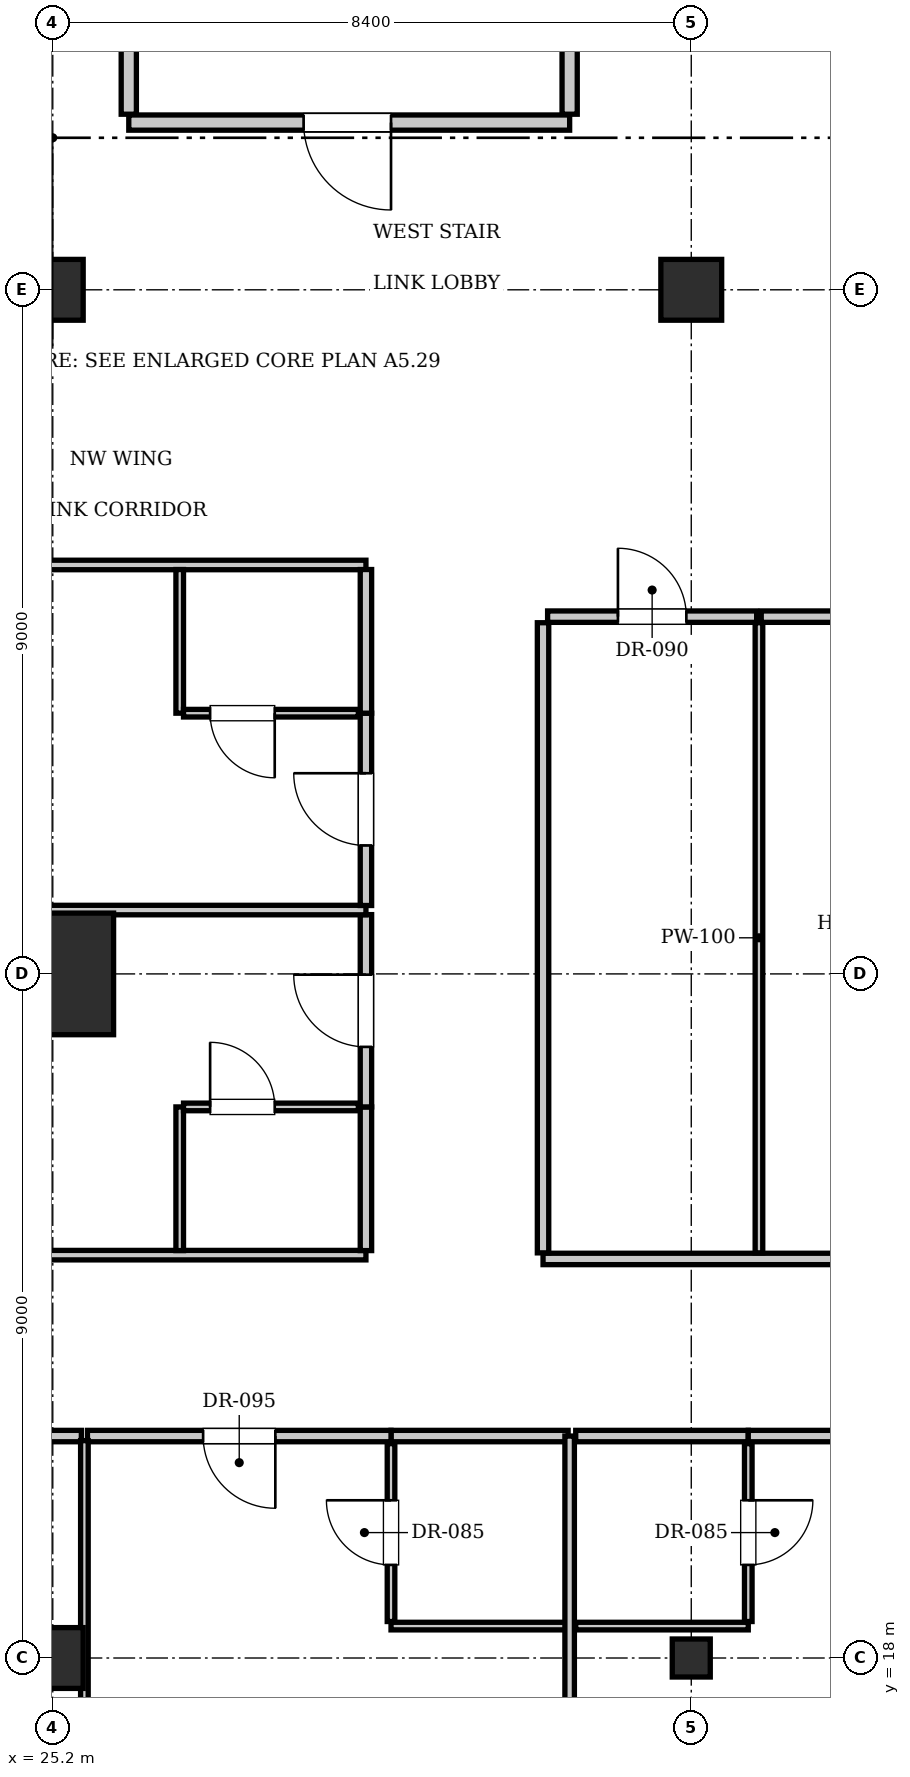
"""IFC4 building model, lengths in metres.
Left out: names, types, materials, properties, quantities, classifications, styles, units other than length and angle.
Written with IfcOpenShell. Run it as: python <this file> out.ifc"""

import sys

from ifc_helpers import new_model, si_unit, direction, frame, frame_2d, origin, origin_2d, place, context, subcontext, project, spatial, rectangle, i_section, extrude, element, fill, save


model = new_model("IFC4")
c1 = context("Model", 3, precision=1e-05, world=origin(), true_north=direction((0.0, 1.0)))
c2 = subcontext(c1, "Body", "Model", "MODEL_VIEW")
j1 = project(units=[si_unit("LENGTHUNIT", "METRE"), si_unit("PLANEANGLEUNIT", "RADIAN")], contexts=[c1])
p1 = place(None, origin())
s1 = spatial("IfcSite", under=j1, at=p1, CompositionType="ELEMENT")
p2 = place(p1, origin())
s2 = spatial("IfcBuilding", under=s1, at=p2, CompositionType="ELEMENT")
p3 = place(p2, frame((0.0, 0.0, 297.15)))
s3 = spatial("IfcBuildingStorey", under=s2, at=p3, CompositionType="ELEMENT", Elevation=297.15)
p4 = place(p3, frame((25.2, 27.0, 0.0), z_axis=(0.0, 0.0, 1.0), x_axis=(1.0, 0.0, 0.0)))
e1 = element("IfcColumn", 1, at=p4, inside=s3, PredefinedType="COLUMN", context=c2, shape_type="SweptSolid", body=[
    extrude(rectangle(XDim=1.6, YDim=1.6, at=origin_2d()), origin(), (0.0, 0.0, 1.0), 3.85),
])
for number, where, z_axis, x_axis in (
    (2, (25.2, 36.0, 0.0), (0.0, 0.0, 1.0), (1.0, 0.0, 0.0)),
    (3, (33.6, 36.0, 0.0), (0.0, 0.0, 1.0), (1.0, 0.0, 0.0)),
    (4, (25.2, 18.0, 0.0), (0.0, 0.0, 1.0), (1.0, 0.0, 0.0)),
):
    element("IfcColumn", number, at=place(p3, frame(where, z_axis=z_axis, x_axis=x_axis)), inside=s3, PredefinedType="COLUMN", context=c2, shape_type="SweptSolid", body=[
        extrude(rectangle(XDim=0.8, YDim=0.8, at=origin_2d()), origin(), (0.0, 0.0, 1.0), 3.85),
    ])
p5 = place(p3, frame((33.6, 18.0, 0.0), z_axis=(0.0, 0.0, 1.0), x_axis=(1.0, 0.0, 0.0)))
e5 = element("IfcColumn", 5, at=p5, inside=s3, PredefinedType="COLUMN", context=c2, shape_type="SweptSolid", body=[
    extrude(i_section(OverallWidth=0.5, OverallDepth=0.5, WebThickness=0.022, FlangeThickness=0.032, at=origin_2d()), origin(), (0.0, 0.0, 1.0), 3.85),
])
p6 = place(p3, frame((26.2, 38.2, 0.0), z_axis=(0.0, 0.0, 1.0), x_axis=(1.0, 0.0, 0.0)))
e6 = element("IfcWall", 6, at=p6, inside=s3, PredefinedType="PARTITIONING", context=c2, shape_type="SweptSolid", body=[
    extrude(rectangle(XDim=5.8, YDim=0.2, at=frame_2d((2.9, 0.0))), origin(), (0.0, 0.0, 1.0), 3.61),
])
p7 = place(p6, frame((2.3, 0.0, 0.0)))
e7 = element("IfcOpeningElement", 7, at=p7, cuts=e6, PredefinedType="OPENING", context=c2, shape_type="SweptSolid", body=[
    extrude(rectangle(XDim=1.15, YDim=2.15, at=frame_2d((0.575, 1.075))), frame((0.0, 0.11, 0.0), z_axis=(0.0, -1.0, 0.0), x_axis=(1.0, 0.0, 0.0)), (0.0, 0.0, 1.0), 0.22),
])
for number, where, z_axis, x_axis in (
    (8, (26.2, 38.31, 0.0), (0.0, 0.0, 1.0), (0.0, 1.0, 0.0)),
    (9, (32.0, 38.31, 0.0), (0.0, 0.0, 1.0), (0.0, 1.0, 0.0)),
):
    element("IfcWall", number, at=place(p3, frame(where, z_axis=z_axis, x_axis=x_axis)), inside=s3, PredefinedType="PARTITIONING", context=c2, shape_type="SweptSolid", body=[
        extrude(rectangle(XDim=3.07, YDim=0.2, at=frame_2d((1.535, 0.0))), origin(), (0.0, 0.0, 1.0), 3.61),
    ])
p8 = place(p3, frame((31.65, 23.25, 0.0), z_axis=(0.0, 0.0, 1.0), x_axis=(1.0, 0.0, 0.0)))
e10 = element("IfcWall", 10, at=p8, inside=s3, PredefinedType="PARTITIONING", context=c2, shape_type="SweptSolid", body=[
    extrude(rectangle(XDim=12.35, YDim=0.15, at=frame_2d((6.175, 0.0))), origin(), (0.0, 0.0, 1.0), 3.61),
])
p9 = place(p3, frame((31.65, 23.33, 0.0), z_axis=(0.0, 0.0, 1.0), x_axis=(0.0, 1.0, 0.0)))
e11 = element("IfcWall", 11, at=p9, inside=s3, PredefinedType="PARTITIONING", context=c2, shape_type="SweptSolid", body=[
    extrude(rectangle(XDim=8.29, YDim=0.15, at=frame_2d((4.145, 0.0))), origin(), (0.0, 0.0, 1.0), 3.61),
])
p10 = place(p3, frame((31.71, 31.7, 0.0), z_axis=(0.0, 0.0, 1.0), x_axis=(1.0, 0.0, 0.0)))
e12 = element("IfcWall", 12, at=p10, inside=s3, PredefinedType="PARTITIONING", context=c2, shape_type="SweptSolid", body=[
    extrude(rectangle(XDim=2.75, YDim=0.15, at=frame_2d((1.375, 0.0))), origin(), (0.0, 0.0, 1.0), 3.61),
])
p11 = place(p10, frame((0.925, 0.0, 0.0)))
e13 = element("IfcOpeningElement", 13, at=p11, cuts=e12, PredefinedType="OPENING", context=c2, shape_type="SweptSolid", body=[
    extrude(rectangle(XDim=0.9, YDim=2.1, at=frame_2d((0.45, 1.05))), frame((0.0, 0.085, 0.0), z_axis=(0.0, -1.0, 0.0), x_axis=(1.0, 0.0, 0.0)), (0.0, 0.0, 1.0), 0.17),
])
p12 = place(p3, frame((34.49, 23.33, 0.0), z_axis=(0.0, 0.0, 1.0), x_axis=(0.0, 1.0, 0.0)))
e14 = element("IfcWall", 14, at=p12, inside=s3, PredefinedType="PARTITIONING", context=c2, shape_type="SweptSolid", body=[
    extrude(rectangle(XDim=8.29, YDim=0.1, at=frame_2d((4.145, 0.0))), origin(), (0.0, 0.0, 1.0), 3.61),
])
p13 = place(p3, frame((34.521, 31.7, 0.0), z_axis=(0.0, 0.0, 1.0), x_axis=(1.0, 0.0, 0.0)))
e15 = element("IfcWall", 15, at=p13, inside=s3, PredefinedType="PARTITIONING", context=c2, shape_type="SweptSolid", body=[
    extrude(rectangle(XDim=4.139, YDim=0.15, at=frame_2d((2.069, 0.0))), origin(), (0.0, 0.0, 1.0), 3.61),
])
p14 = place(p13, frame((1.619, 0.0, 0.0)))
e16 = element("IfcOpeningElement", 16, at=p14, cuts=e15, PredefinedType="OPENING", context=c2, shape_type="SweptSolid", body=[
    extrude(rectangle(XDim=0.9, YDim=2.1, at=frame_2d((0.45, 1.05))), frame((0.0, 0.085, 0.0), z_axis=(0.0, -1.0, 0.0), x_axis=(1.0, 0.0, 0.0)), (0.0, 0.0, 1.0), 0.17),
])
p15 = place(p3, frame((29.65, 20.92, 0.0), z_axis=(0.0, 0.0, 1.0), x_axis=(1.0, 0.0, 0.0)))
e17 = element("IfcWall", 17, at=p15, inside=s3, PredefinedType="PARTITIONING", context=c2, shape_type="SweptSolid", body=[
    extrude(rectangle(XDim=2.33, YDim=0.15, at=frame_2d((1.165, 0.0))), origin(), (0.0, 0.0, 1.0), 3.61),
])
p16 = place(p3, frame((29.65, 18.42, 0.0), z_axis=(0.0, 0.0, 1.0), x_axis=(1.0, 0.0, 0.0)))
e18 = element("IfcWall", 18, at=p16, inside=s3, PredefinedType="PARTITIONING", context=c2, shape_type="SweptSolid", body=[
    extrude(rectangle(XDim=2.31, YDim=0.1, at=frame_2d((1.155, 0.0))), origin(), (0.0, 0.0, 1.0), 3.61),
])
p17 = place(p3, frame((29.65, 18.48, 0.0), z_axis=(0.0, 0.0, 1.0), x_axis=(0.0, 1.0, 0.0)))
e19 = element("IfcWall", 19, at=p17, inside=s3, PredefinedType="PARTITIONING", context=c2, shape_type="SweptSolid", body=[
    extrude(rectangle(XDim=2.34, YDim=0.1, at=frame_2d((1.17, 0.0))), origin(), (0.0, 0.0, 1.0), 3.61),
])
p18 = place(p17, frame((0.745, 0.0, 0.0)))
e20 = element("IfcOpeningElement", 20, at=p18, cuts=e19, PredefinedType="OPENING", context=c2, shape_type="SweptSolid", body=[
    extrude(rectangle(XDim=0.85, YDim=2.1, at=frame_2d((0.425, 1.05))), frame((0.0, 0.06, 0.0), z_axis=(0.0, -1.0, 0.0), x_axis=(1.0, 0.0, 0.0)), (0.0, 0.0, 1.0), 0.12),
])
p19 = place(p3, frame((20.62, 20.92, 0.0), z_axis=(0.0, 0.0, 1.0), x_axis=(1.0, 0.0, 0.0)))
e21 = element("IfcWall", 21, at=p19, inside=s3, PredefinedType="PARTITIONING", context=c2, shape_type="SweptSolid", body=[
    extrude(rectangle(XDim=4.956, YDim=0.15, at=frame_2d((2.478, 0.0))), origin(), (0.0, 0.0, 1.0), 3.61),
])
p20 = place(p3, frame((25.656, 20.92, 0.0), z_axis=(0.0, 0.0, 1.0), x_axis=(1.0, 0.0, 0.0)))
e22 = element("IfcWall", 22, at=p20, inside=s3, PredefinedType="PARTITIONING", context=c2, shape_type="SweptSolid", body=[
    extrude(rectangle(XDim=3.994, YDim=0.15, at=frame_2d((1.997, 0.0))), origin(), (0.0, 0.0, 1.0), 3.61),
])
p21 = place(p20, frame((1.522, 0.0, 0.0)))
e23 = element("IfcOpeningElement", 23, at=p21, cuts=e22, PredefinedType="OPENING", context=c2, shape_type="SweptSolid", body=[
    extrude(rectangle(XDim=0.95, YDim=2.15, at=frame_2d((0.475, 1.075))), frame((0.0, 0.085, 0.0), z_axis=(0.0, -1.0, 0.0), x_axis=(1.0, 0.0, 0.0)), (0.0, 0.0, 1.0), 0.17),
])
p22 = place(p3, frame((25.616, 9.23, 0.0), z_axis=(0.0, 0.0, 1.0), x_axis=(0.0, 1.0, 0.0)))
e24 = element("IfcWall", 24, at=p22, inside=s3, PredefinedType="PARTITIONING", context=c2, shape_type="SweptSolid", body=[
    extrude(rectangle(XDim=11.63, YDim=0.1, at=frame_2d((5.815, 0.0))), origin(), (0.0, 0.0, 1.0), 3.61),
])
p23 = place(p22, frame((1.6, 0.0, 0.0)))
e25 = element("IfcOpeningElement", 25, at=p23, cuts=e24, PredefinedType="OPENING", context=c2, shape_type="SweptSolid", body=[
    extrude(rectangle(XDim=0.9, YDim=2.1, at=frame_2d((0.45, 1.05))), frame((0.0, 0.06, 0.0), z_axis=(0.0, -1.0, 0.0), x_axis=(1.0, 0.0, 0.0)), (0.0, 0.0, 1.0), 0.12),
])
p24 = place(p3, frame((32.0, 9.3, 0.0), z_axis=(0.0, 0.0, 1.0), x_axis=(0.0, 1.0, 0.0)))
e26 = element("IfcWall", 26, at=p24, inside=s3, PredefinedType="PARTITIONING", context=c2, shape_type="SweptSolid", body=[
    extrude(rectangle(XDim=11.62, YDim=0.125, at=frame_2d((5.81, 0.0))), origin(), (0.0, 0.0, 1.0), 3.61),
])
p25 = place(p3, frame((32.08, 20.92, 0.0), z_axis=(0.0, 0.0, 1.0), x_axis=(1.0, 0.0, 0.0)))
e27 = element("IfcWall", 27, at=p25, inside=s3, PredefinedType="PARTITIONING", context=c2, shape_type="SweptSolid", body=[
    extrude(rectangle(XDim=2.27, YDim=0.15, at=frame_2d((1.135, 0.0))), origin(), (0.0, 0.0, 1.0), 3.61),
])
p26 = place(p3, frame((32.08, 18.42, 0.0), z_axis=(0.0, 0.0, 1.0), x_axis=(1.0, 0.0, 0.0)))
e28 = element("IfcWall", 28, at=p26, inside=s3, PredefinedType="PARTITIONING", context=c2, shape_type="SweptSolid", body=[
    extrude(rectangle(XDim=2.27, YDim=0.1, at=frame_2d((1.135, 0.0))), origin(), (0.0, 0.0, 1.0), 3.61),
])
p27 = place(p3, frame((34.35, 18.48, 0.0), z_axis=(0.0, 0.0, 1.0), x_axis=(0.0, 1.0, 0.0)))
e29 = element("IfcWall", 29, at=p27, inside=s3, PredefinedType="PARTITIONING", context=c2, shape_type="SweptSolid", body=[
    extrude(rectangle(XDim=2.34, YDim=0.1, at=frame_2d((1.17, 0.0))), origin(), (0.0, 0.0, 1.0), 3.61),
])
p28 = place(p27, frame((0.745, 0.0, 0.0)))
e30 = element("IfcOpeningElement", 30, at=p28, cuts=e29, PredefinedType="OPENING", context=c2, shape_type="SweptSolid", body=[
    extrude(rectangle(XDim=0.85, YDim=2.1, at=frame_2d((0.425, 1.05))), frame((0.0, 0.06, 0.0), z_axis=(0.0, -1.0, 0.0), x_axis=(1.0, 0.0, 0.0)), (0.0, 0.0, 1.0), 0.12),
])
p29 = place(p3, frame((34.35, 20.92, 0.0), z_axis=(0.0, 0.0, 1.0), x_axis=(1.0, 0.0, 0.0)))
e31 = element("IfcWall", 31, at=p29, inside=s3, PredefinedType="PARTITIONING", context=c2, shape_type="SweptSolid", body=[
    extrude(rectangle(XDim=4.106, YDim=0.15, at=frame_2d((2.053, 0.0))), origin(), (0.0, 0.0, 1.0), 3.61),
])
p30 = place(p29, frame((1.578, 0.0, 0.0)))
e32 = element("IfcOpeningElement", 32, at=p30, cuts=e31, PredefinedType="OPENING", context=c2, shape_type="SweptSolid", body=[
    extrude(rectangle(XDim=0.95, YDim=2.15, at=frame_2d((0.475, 1.075))), frame((0.0, 0.085, 0.0), z_axis=(0.0, -1.0, 0.0), x_axis=(1.0, 0.0, 0.0)), (0.0, 0.0, 1.0), 0.17),
])
for number, where, z_axis, x_axis in (
    (33, (15.5, 23.3, 0.0), (0.0, 0.0, 1.0), (1.0, 0.0, 0.0)),
    (34, (15.5, 32.38, 0.0), (0.0, 0.0, 1.0), (1.0, 0.0, 0.0)),
):
    element("IfcWall", number, at=place(p3, frame(where, z_axis=z_axis, x_axis=x_axis)), inside=s3, PredefinedType="PARTITIONING", context=c2, shape_type="SweptSolid", body=[
        extrude(rectangle(XDim=13.82, YDim=0.125, at=frame_2d((6.91, 0.0))), origin(), (0.0, 0.0, 1.0), 3.61),
    ])
p31 = place(p3, frame((29.32, 23.36, 0.0), z_axis=(0.0, 0.0, 1.0), x_axis=(0.0, 1.0, 0.0)))
e35 = element("IfcWall", 35, at=p31, inside=s3, PredefinedType="PARTITIONING", context=c2, shape_type="SweptSolid", body=[
    extrude(rectangle(XDim=1.89, YDim=0.15, at=frame_2d((0.945, 0.0))), origin(), (0.0, 0.0, 1.0), 3.61),
])
p32 = place(p3, frame((29.32, 25.25, 0.0), z_axis=(0.0, 0.0, 1.0), x_axis=(0.0, 1.0, 0.0)))
e36 = element("IfcWall", 36, at=p32, inside=s3, PredefinedType="PARTITIONING", context=c2, shape_type="SweptSolid", body=[
    extrude(rectangle(XDim=2.53, YDim=0.15, at=frame_2d((1.265, 0.0))), origin(), (0.0, 0.0, 1.0), 3.61),
])
p33 = place(p32, frame((0.79, 0.0, 0.0)))
e37 = element("IfcOpeningElement", 37, at=p33, cuts=e36, PredefinedType="OPENING", context=c2, shape_type="SweptSolid", body=[
    extrude(rectangle(XDim=0.95, YDim=2.15, at=frame_2d((0.475, 1.075))), frame((0.0, 0.085, 0.0), z_axis=(0.0, -1.0, 0.0), x_axis=(1.0, 0.0, 0.0)), (0.0, 0.0, 1.0), 0.17),
])
p34 = place(p3, frame((26.87, 23.36, 0.0), z_axis=(0.0, 0.0, 1.0), x_axis=(0.0, 1.0, 0.0)))
e38 = element("IfcWall", 38, at=p34, inside=s3, PredefinedType="PARTITIONING", context=c2, shape_type="SweptSolid", body=[
    extrude(rectangle(XDim=1.89, YDim=0.1, at=frame_2d((0.945, 0.0))), origin(), (0.0, 0.0, 1.0), 3.61),
])
p35 = place(p3, frame((26.92, 25.25, 0.0), z_axis=(0.0, 0.0, 1.0), x_axis=(1.0, 0.0, 0.0)))
e39 = element("IfcWall", 39, at=p35, inside=s3, PredefinedType="PARTITIONING", context=c2, shape_type="SweptSolid", body=[
    extrude(rectangle(XDim=2.3, YDim=0.1, at=frame_2d((1.15, 0.0))), origin(), (0.0, 0.0, 1.0), 3.61),
])
p36 = place(p35, frame((0.35, 0.0, 0.0)))
e40 = element("IfcOpeningElement", 40, at=p36, cuts=e39, PredefinedType="OPENING", context=c2, shape_type="SweptSolid", body=[
    extrude(rectangle(XDim=0.85, YDim=2.1, at=frame_2d((0.425, 1.05))), frame((0.0, 0.06, 0.0), z_axis=(0.0, -1.0, 0.0), x_axis=(1.0, 0.0, 0.0)), (0.0, 0.0, 1.0), 0.12),
])
p37 = place(p3, frame((15.5, 27.84, 0.0), z_axis=(0.0, 0.0, 1.0), x_axis=(1.0, 0.0, 0.0)))
e41 = element("IfcWall", 41, at=p37, inside=s3, PredefinedType="PARTITIONING", context=c2, shape_type="SweptSolid", body=[
    extrude(rectangle(XDim=13.82, YDim=0.125, at=frame_2d((6.91, 0.0))), origin(), (0.0, 0.0, 1.0), 3.61),
])
p38 = place(p3, frame((29.32, 27.9, 0.0), z_axis=(0.0, 0.0, 1.0), x_axis=(0.0, 1.0, 0.0)))
e42 = element("IfcWall", 42, at=p38, inside=s3, PredefinedType="PARTITIONING", context=c2, shape_type="SweptSolid", body=[
    extrude(rectangle(XDim=2.53, YDim=0.15, at=frame_2d((1.265, 0.0))), origin(), (0.0, 0.0, 1.0), 3.61),
])
p39 = place(p38, frame((0.79, 0.0, 0.0)))
e43 = element("IfcOpeningElement", 43, at=p39, cuts=e42, PredefinedType="OPENING", context=c2, shape_type="SweptSolid", body=[
    extrude(rectangle(XDim=0.95, YDim=2.15, at=frame_2d((0.475, 1.075))), frame((0.0, 0.085, 0.0), z_axis=(0.0, -1.0, 0.0), x_axis=(1.0, 0.0, 0.0)), (0.0, 0.0, 1.0), 0.17),
])
p40 = place(p3, frame((29.32, 30.43, 0.0), z_axis=(0.0, 0.0, 1.0), x_axis=(0.0, 1.0, 0.0)))
e44 = element("IfcWall", 44, at=p40, inside=s3, PredefinedType="PARTITIONING", context=c2, shape_type="SweptSolid", body=[
    extrude(rectangle(XDim=1.89, YDim=0.15, at=frame_2d((0.945, 0.0))), origin(), (0.0, 0.0, 1.0), 3.61),
])
p41 = place(p3, frame((26.87, 30.43, 0.0), z_axis=(0.0, 0.0, 1.0), x_axis=(0.0, 1.0, 0.0)))
e45 = element("IfcWall", 45, at=p41, inside=s3, PredefinedType="PARTITIONING", context=c2, shape_type="SweptSolid", body=[
    extrude(rectangle(XDim=1.89, YDim=0.1, at=frame_2d((0.945, 0.0))), origin(), (0.0, 0.0, 1.0), 3.61),
])
p42 = place(p3, frame((26.92, 30.43, 0.0), z_axis=(0.0, 0.0, 1.0), x_axis=(1.0, 0.0, 0.0)))
e46 = element("IfcWall", 46, at=p42, inside=s3, PredefinedType="PARTITIONING", context=c2, shape_type="SweptSolid", body=[
    extrude(rectangle(XDim=2.3, YDim=0.1, at=frame_2d((1.15, 0.0))), origin(), (0.0, 0.0, 1.0), 3.61),
])
p43 = place(p42, frame((0.35, 0.0, 0.0)))
e47 = element("IfcOpeningElement", 47, at=p43, cuts=e46, PredefinedType="OPENING", context=c2, shape_type="SweptSolid", body=[
    extrude(rectangle(XDim=0.85, YDim=2.1, at=frame_2d((0.425, 1.05))), frame((0.0, 0.06, 0.0), z_axis=(0.0, -1.0, 0.0), x_axis=(1.0, 0.0, 0.0)), (0.0, 0.0, 1.0), 0.12),
])
p44 = place(p7, frame((1.15, 0.0, 0.0), z_axis=(0.0, 0.0, 1.0), x_axis=(-1.0, 0.0, 0.0)))
e48 = element("IfcDoor", 48, at=p44, inside=s3, OperationType="SINGLE_SWING_LEFT", PredefinedType="DOOR", context=c2, shape_type="SweptSolid", body=[
    extrude(rectangle(XDim=1.15, YDim=2.15, at=frame_2d((0.575, 1.075))), frame((0.0, 0.025, 0.0), z_axis=(0.0, -1.0, 0.0), x_axis=(1.0, 0.0, 0.0)), (0.0, 0.0, 1.0), 0.05),
])
fill(e7, e48)
p45 = place(p11, origin())
e49 = element("IfcDoor", 49, at=p45, inside=s3, OperationType="SINGLE_SWING_LEFT", PredefinedType="DOOR", context=c2, shape_type="SweptSolid", body=[
    extrude(rectangle(XDim=0.9, YDim=2.1, at=frame_2d((0.45, 1.05))), frame((0.0, 0.025, 0.0), z_axis=(0.0, -1.0, 0.0), x_axis=(1.0, 0.0, 0.0)), (0.0, 0.0, 1.0), 0.05),
])
fill(e13, e49)
p46 = place(p18, origin())
e50 = element("IfcDoor", 50, at=p46, inside=s3, OperationType="SINGLE_SWING_RIGHT", PredefinedType="DOOR", context=c2, shape_type="SweptSolid", body=[
    extrude(rectangle(XDim=0.85, YDim=2.1, at=frame_2d((0.425, 1.05))), frame((0.0, 0.025, 0.0), z_axis=(0.0, -1.0, 0.0), x_axis=(1.0, 0.0, 0.0)), (0.0, 0.0, 1.0), 0.05),
])
fill(e20, e50)
p47 = place(p21, frame((0.95, 0.0, 0.0), z_axis=(0.0, 0.0, 1.0), x_axis=(-1.0, 0.0, 0.0)))
e51 = element("IfcDoor", 51, at=p47, inside=s3, OperationType="SINGLE_SWING_LEFT", PredefinedType="DOOR", context=c2, shape_type="SweptSolid", body=[
    extrude(rectangle(XDim=0.95, YDim=2.15, at=frame_2d((0.475, 1.075))), frame((0.0, 0.025, 0.0), z_axis=(0.0, -1.0, 0.0), x_axis=(1.0, 0.0, 0.0)), (0.0, 0.0, 1.0), 0.05),
])
fill(e23, e51)
p48 = place(p28, frame((0.85, 0.0, 0.0), z_axis=(0.0, 0.0, 1.0), x_axis=(-1.0, 0.0, 0.0)))
e52 = element("IfcDoor", 52, at=p48, inside=s3, OperationType="SINGLE_SWING_LEFT", PredefinedType="DOOR", context=c2, shape_type="SweptSolid", body=[
    extrude(rectangle(XDim=0.85, YDim=2.1, at=frame_2d((0.425, 1.05))), frame((0.0, 0.025, 0.0), z_axis=(0.0, -1.0, 0.0), x_axis=(1.0, 0.0, 0.0)), (0.0, 0.0, 1.0), 0.05),
])
fill(e30, e52)
p49 = place(p36, origin())
e53 = element("IfcDoor", 53, at=p49, inside=s3, OperationType="SINGLE_SWING_LEFT", PredefinedType="DOOR", context=c2, shape_type="SweptSolid", body=[
    extrude(rectangle(XDim=0.85, YDim=2.1, at=frame_2d((0.425, 1.05))), frame((0.0, 0.025, 0.0), z_axis=(0.0, -1.0, 0.0), x_axis=(1.0, 0.0, 0.0)), (0.0, 0.0, 1.0), 0.05),
])
fill(e40, e53)
p50 = place(p33, origin())
e54 = element("IfcDoor", 54, at=p50, inside=s3, OperationType="SINGLE_SWING_RIGHT", PredefinedType="DOOR", context=c2, shape_type="SweptSolid", body=[
    extrude(rectangle(XDim=0.95, YDim=2.15, at=frame_2d((0.475, 1.075))), frame((0.0, 0.025, 0.0), z_axis=(0.0, -1.0, 0.0), x_axis=(1.0, 0.0, 0.0)), (0.0, 0.0, 1.0), 0.05),
])
fill(e37, e54)
p51 = place(p43, frame((0.85, 0.0, 0.0), z_axis=(0.0, 0.0, 1.0), x_axis=(-1.0, 0.0, 0.0)))
e55 = element("IfcDoor", 55, at=p51, inside=s3, OperationType="SINGLE_SWING_LEFT", PredefinedType="DOOR", context=c2, shape_type="SweptSolid", body=[
    extrude(rectangle(XDim=0.85, YDim=2.1, at=frame_2d((0.425, 1.05))), frame((0.0, 0.025, 0.0), z_axis=(0.0, -1.0, 0.0), x_axis=(1.0, 0.0, 0.0)), (0.0, 0.0, 1.0), 0.05),
])
fill(e47, e55)
p52 = place(p39, origin())
e56 = element("IfcDoor", 56, at=p52, inside=s3, OperationType="SINGLE_SWING_RIGHT", PredefinedType="DOOR", context=c2, shape_type="SweptSolid", body=[
    extrude(rectangle(XDim=0.95, YDim=2.15, at=frame_2d((0.475, 1.075))), frame((0.0, 0.025, 0.0), z_axis=(0.0, -1.0, 0.0), x_axis=(1.0, 0.0, 0.0)), (0.0, 0.0, 1.0), 0.05),
])
fill(e43, e56)
save(model, sys.argv[1])
